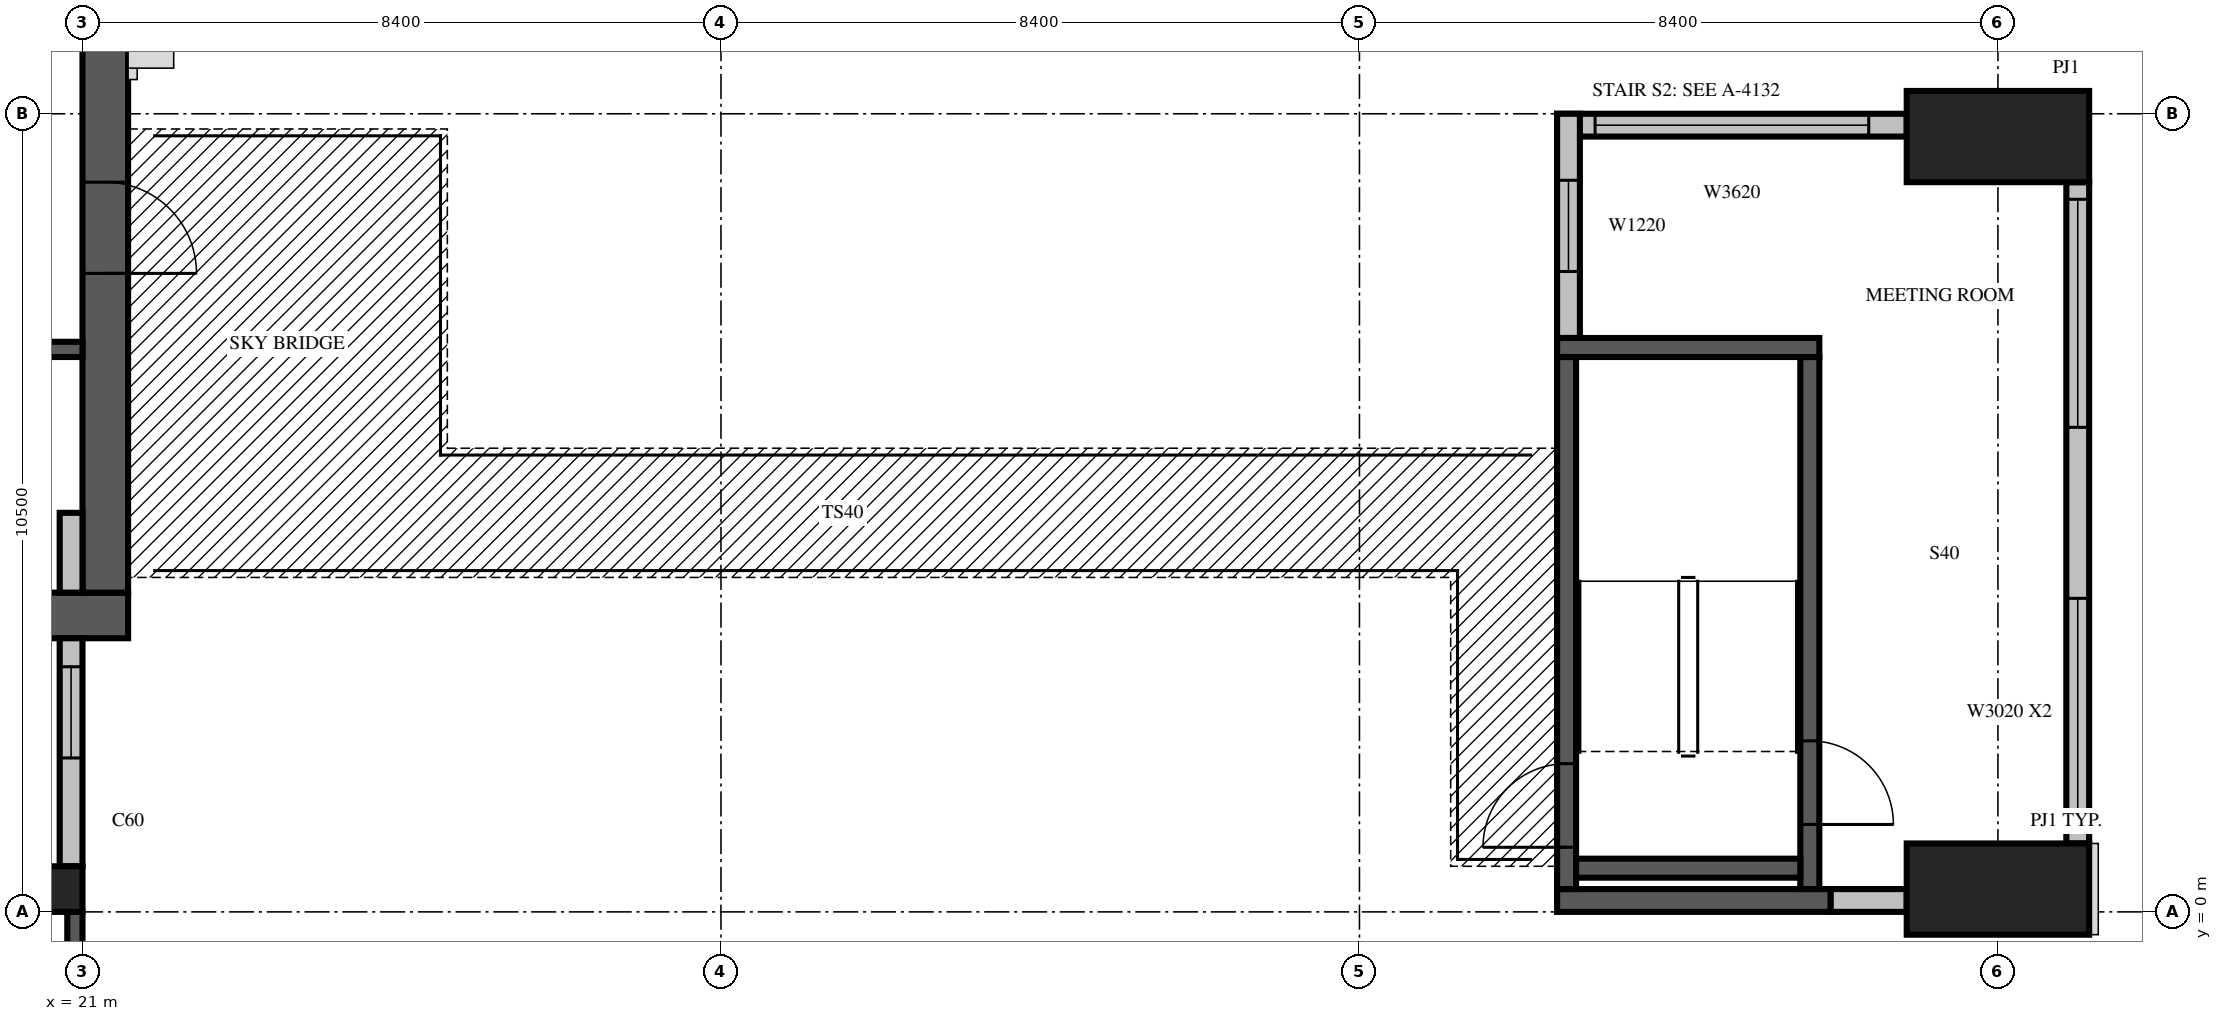
"""IFC4 building model, lengths in metres.
Left out: names, types, materials, properties, quantities, classifications, styles, units other than length and angle.
Written with IfcOpenShell. Run it as: python <this file> out.ifc"""

import sys

from ifc_helpers import new_model, si_unit, direction, frame, frame_2d, origin, origin_2d, place, context, subcontext, project, spatial, rectangle, extrude, source, transform, mapped, element, fill, save


model = new_model("IFC4")
c1 = context("Model", 3, precision=1e-05, world=origin(), true_north=direction((0.0, 1.0)))
c2 = subcontext(c1, "Body", "Model", "MODEL_VIEW")
j1 = project(units=[si_unit("LENGTHUNIT", "METRE"), si_unit("PLANEANGLEUNIT", "RADIAN")], contexts=[c1])
p1 = place(None, origin())
s1 = spatial("IfcSite", under=j1, at=p1, CompositionType="ELEMENT")
p2 = place(p1, origin())
s2 = spatial("IfcBuilding", under=s1, at=p2, CompositionType="ELEMENT")
p3 = place(p2, frame((0.0, 0.0, 333.5)))
s3 = spatial("IfcBuildingStorey", under=s2, at=p3, CompositionType="ELEMENT", Elevation=333.5)
m1 = source(origin(), c2, "Body", "SweptSolid", [
    extrude(rectangle(XDim=0.6, YDim=0.6, at=origin_2d()), origin(), (0.0, 0.0, 1.0), 3.5),
])
p4 = place(p3, frame((20.7, 0.3, 0.0), z_axis=(0.0, 0.0, 1.0), x_axis=(1.0, 0.0, 0.0)))
e1 = element("IfcColumn", 1, at=p4, inside=s3, PredefinedType="COLUMN", context=c2, shape_type="MappedRepresentation", body=[
    mapped(m1, transform((0.0, 0.0, 0.0), scale=1.0)),
])
m2 = source(origin(), c2, "Body", "SweptSolid", [
    extrude(rectangle(XDim=2.4, YDim=1.2, at=origin_2d()), origin(), (0.0, 0.0, 1.0), 3.5),
])
for number, where, z_axis, x_axis in (
    (2, (46.2, 0.3, 0.0), (0.0, 0.0, 1.0), (1.0, 0.0, 0.0)),
    (3, (46.2, 10.2, 0.0), (0.0, 0.0, 1.0), (1.0, 0.0, 0.0)),
):
    element("IfcColumn", number, at=place(p3, frame(where, z_axis=z_axis, x_axis=x_axis)), inside=s3, PredefinedType="PILASTER", context=c2, shape_type="MappedRepresentation", body=[
        mapped(m2, transform((0.0, 0.0, 0.0), scale=1.0)),
    ])
m3 = source(origin(), c2, "Body", "SweptSolid", [
    extrude(rectangle(XDim=17.4, YDim=0.6, at=frame_2d((8.7, 0.0))), origin(), (0.0, 0.0, 1.0), 3.5),
])
p5 = place(p3, frame((4.2, 3.9, 0.0), z_axis=(0.0, 0.0, 1.0), x_axis=(1.0, 0.0, 0.0)))
e4 = element("IfcWall", 4, at=p5, inside=s3, PredefinedType="SHEAR", context=c2, shape_type="MappedRepresentation", body=[
    mapped(m3, transform((0.0, 0.0, 0.0), scale=1.0)),
])
m4 = source(origin(), c2, "Body", "SweptSolid", [
    extrude(rectangle(XDim=0.9, YDim=2.1, at=frame_2d((0.45, 1.05))), frame((0.0, 0.31, 0.0), z_axis=(0.0, -1.0, 0.0), x_axis=(1.0, 0.0, 0.0)), (0.0, 0.0, 1.0), 0.62),
])
p6 = place(p5, frame((15.2, 0.0, 0.0)))
e5 = element("IfcOpeningElement", 5, at=p6, cuts=e4, PredefinedType="OPENING", context=c2, shape_type="MappedRepresentation", body=[
    mapped(m4, transform((0.0, 0.0, 0.0), scale=1.0)),
])
p7 = place(p3, frame((21.3, 4.2, 0.0), z_axis=(0.0, 0.0, 1.0), x_axis=(0.0, 1.0, 0.0)))
e6 = element("IfcWall", 6, at=p7, inside=s3, PredefinedType="SHEAR", context=c2, shape_type="SweptSolid", body=[
    extrude(rectangle(XDim=16.8, YDim=0.6, at=frame_2d((8.4, 0.0))), origin(), (0.0, 0.0, 1.0), 3.5),
])
m5 = source(origin(), c2, "Body", "SweptSolid", [
    extrude(rectangle(XDim=1.2, YDim=2.1, at=frame_2d((0.6, 1.05))), frame((0.0, 0.31, 0.0), z_axis=(0.0, -1.0, 0.0), x_axis=(1.0, 0.0, 0.0)), (0.0, 0.0, 1.0), 0.62),
])
p8 = place(p7, frame((4.2, 0.0, 0.0)))
e7 = element("IfcOpeningElement", 7, at=p8, cuts=e6, PredefinedType="OPENING", context=c2, shape_type="MappedRepresentation", body=[
    mapped(m5, transform((0.0, 0.0, 0.0), scale=1.0)),
])
m6 = source(origin(), c2, "Body", "SweptSolid", [
    extrude(rectangle(XDim=1.2, YDim=2.4, at=frame_2d((0.6, 1.2))), frame((0.0, 0.31, 0.0), z_axis=(0.0, -1.0, 0.0), x_axis=(1.0, 0.0, 0.0)), (0.0, 0.0, 1.0), 0.62),
])
p9 = place(p7, frame((12.0, 0.0, 0.6)))
e8 = element("IfcOpeningElement", 8, at=p9, cuts=e6, PredefinedType="OPENING", context=c2, shape_type="MappedRepresentation", body=[
    mapped(m6, transform((0.0, 0.0, 0.0), scale=1.0)),
])
m7 = source(origin(), c2, "Body", "SweptSolid", [
    extrude(rectangle(XDim=3.0, YDim=0.3, at=frame_2d((1.5, 0.0))), origin(), (0.0, 0.0, 1.0), 3.1),
])
p10 = place(p3, frame((20.85, 0.6, 0.0), z_axis=(0.0, 0.0, 1.0), x_axis=(0.0, 1.0, 0.0)))
e9 = element("IfcWall", 9, at=p10, inside=s3, PredefinedType="STANDARD", context=c2, shape_type="MappedRepresentation", body=[
    mapped(m7, transform((0.0, 0.0, 0.0), scale=1.0)),
])
m8 = source(origin(), c2, "Body", "SweptSolid", [
    extrude(rectangle(XDim=1.2, YDim=2.0, at=frame_2d((0.6, 1.0))), frame((0.0, 0.16, 0.0), z_axis=(0.0, -1.0, 0.0), x_axis=(1.0, 0.0, 0.0)), (0.0, 0.0, 1.0), 0.32),
])
p11 = place(p10, frame((1.425, 0.0, 0.6)))
e10 = element("IfcOpeningElement", 10, at=p11, cuts=e9, PredefinedType="OPENING", context=c2, shape_type="MappedRepresentation", body=[
    mapped(m8, transform((0.0, 0.0, 0.0), scale=1.0)),
])
m9 = source(origin(), c2, "Body", "SweptSolid", [
    extrude(rectangle(XDim=1.05, YDim=0.3, at=frame_2d((0.525, 0.0))), origin(), (0.0, 0.0, 1.0), 3.1),
])
p12 = place(p3, frame((20.85, 4.2, 0.0), z_axis=(0.0, 0.0, 1.0), x_axis=(0.0, 1.0, 0.0)))
e11 = element("IfcWall", 11, at=p12, inside=s3, PredefinedType="STANDARD", context=c2, shape_type="MappedRepresentation", body=[
    mapped(m9, transform((0.0, 0.0, 0.0), scale=1.0)),
])
p13 = place(p3, frame((40.4, 0.15, 0.0), z_axis=(0.0, 0.0, 1.0), x_axis=(1.0, 0.0, 0.0)))
e12 = element("IfcWall", 12, at=p13, inside=s3, PredefinedType="SOLIDWALL", context=c2, shape_type="SweptSolid", body=[
    extrude(rectangle(XDim=3.6, YDim=0.3, at=frame_2d((1.8, 0.0))), origin(), (0.0, 0.0, 1.0), 3.1),
])
p14 = place(p3, frame((44.0, 0.15, 0.0), z_axis=(0.0, 0.0, 1.0), x_axis=(1.0, 0.0, 0.0)))
e13 = element("IfcWall", 13, at=p14, inside=s3, PredefinedType="STANDARD", context=c2, shape_type="SweptSolid", body=[
    extrude(rectangle(XDim=1.0, YDim=0.3, at=frame_2d((0.5, 0.0))), origin(), (0.0, 0.0, 1.0), 3.1),
])
p15 = place(p3, frame((47.25, 0.9, 0.0), z_axis=(0.0, 0.0, 1.0), x_axis=(0.0, 1.0, 0.0)))
e14 = element("IfcWall", 14, at=p15, inside=s3, PredefinedType="STANDARD", context=c2, shape_type="SweptSolid", body=[
    extrude(rectangle(XDim=8.7, YDim=0.3, at=frame_2d((4.35, 0.0))), origin(), (0.0, 0.0, 1.0), 3.1),
])
m10 = source(origin(), c2, "Body", "SweptSolid", [
    extrude(rectangle(XDim=3.0, YDim=2.0, at=frame_2d((1.5, 1.0))), frame((0.0, 0.16, 0.0), z_axis=(0.0, -1.0, 0.0), x_axis=(1.0, 0.0, 0.0)), (0.0, 0.0, 1.0), 0.32),
])
p16 = place(p15, frame((0.225, 0.0, 0.6)))
e15 = element("IfcOpeningElement", 15, at=p16, cuts=e14, PredefinedType="OPENING", context=c2, shape_type="MappedRepresentation", body=[
    mapped(m10, transform((0.0, 0.0, 0.0), scale=1.0)),
])
p17 = place(p15, frame((5.475, 0.0, 0.6)))
e16 = element("IfcOpeningElement", 16, at=p17, cuts=e14, PredefinedType="OPENING", context=c2, shape_type="MappedRepresentation", body=[
    mapped(m10, transform((0.0, 0.0, 0.0), scale=1.0)),
])
p18 = place(p3, frame((45.0, 10.35, 0.0), z_axis=(0.0, 0.0, 1.0), x_axis=(-1.0, 0.0, 0.0)))
e17 = element("IfcWall", 17, at=p18, inside=s3, PredefinedType="STANDARD", context=c2, shape_type="SweptSolid", body=[
    extrude(rectangle(XDim=4.6, YDim=0.3, at=frame_2d((2.3, 0.0))), origin(), (0.0, 0.0, 1.0), 3.1),
])
m11 = source(origin(), c2, "Body", "SweptSolid", [
    extrude(rectangle(XDim=3.6, YDim=2.0, at=frame_2d((1.8, 1.0))), frame((0.0, 0.16, 0.0), z_axis=(0.0, -1.0, 0.0), x_axis=(1.0, 0.0, 0.0)), (0.0, 0.0, 1.0), 0.32),
])
p19 = place(p18, frame((0.5, 0.0, 0.6)))
e18 = element("IfcOpeningElement", 18, at=p19, cuts=e17, PredefinedType="OPENING", context=c2, shape_type="MappedRepresentation", body=[
    mapped(m11, transform((0.0, 0.0, 0.0), scale=1.0)),
])
p20 = place(p3, frame((40.55, 10.5, 0.0), z_axis=(0.0, 0.0, 1.0), x_axis=(0.0, -1.0, 0.0)))
e19 = element("IfcWall", 19, at=p20, inside=s3, PredefinedType="STANDARD", context=c2, shape_type="SweptSolid", body=[
    extrude(rectangle(XDim=2.95, YDim=0.3, at=frame_2d((1.475, 0.0))), origin(), (0.0, 0.0, 1.0), 3.1),
])
p21 = place(p20, frame((0.875, 0.0, 0.6)))
e20 = element("IfcOpeningElement", 20, at=p21, cuts=e19, PredefinedType="OPENING", context=c2, shape_type="MappedRepresentation", body=[
    mapped(m8, transform((0.0, 0.0, 0.0), scale=1.0)),
])
m12 = source(origin(), c2, "Body", "SweptSolid", [
    extrude(rectangle(XDim=3.9, YDim=0.2, at=frame_2d((1.95, 0.0))), origin(), (0.0, 0.0, 1.0), 3.09),
])
p22 = place(p3, frame((20.9, 0.0, 0.0), z_axis=(0.0, 0.0, 1.0), x_axis=(0.0, -1.0, 0.0)))
e21 = element("IfcWall", 21, at=p22, inside=s3, PredefinedType="SOLIDWALL", context=c2, shape_type="MappedRepresentation", body=[
    mapped(m12, transform((0.0, 0.0, 0.0), scale=1.0)),
])
m13 = source(origin(), c2, "Body", "SweptSolid", [
    extrude(rectangle(XDim=2.4, YDim=2.0, at=frame_2d((1.2, 1.0))), frame((0.0, 0.11, 0.0), z_axis=(0.0, -1.0, 0.0), x_axis=(1.0, 0.0, 0.0)), (0.0, 0.0, 1.0), 0.22),
])
p23 = place(p22, frame((0.75, 0.0, 0.6)))
e22 = element("IfcOpeningElement", 22, at=p23, cuts=e21, PredefinedType="OPENING", context=c2, shape_type="MappedRepresentation", body=[
    mapped(m13, transform((0.0, 0.0, 0.0), scale=1.0)),
])
m14 = source(origin(), c2, "Body", "SweptSolid", [
    extrude(rectangle(XDim=7.2, YDim=0.2, at=frame_2d((3.6, 0.0))), origin(), (0.0, 0.0, 1.0), 3.1),
])
p24 = place(p3, frame((13.8, 7.4, 0.0), z_axis=(0.0, 0.0, 1.0), x_axis=(1.0, 0.0, 0.0)))
e23 = element("IfcWall", 23, at=p24, inside=s3, PredefinedType="SOLIDWALL", context=c2, shape_type="MappedRepresentation", body=[
    mapped(m14, transform((0.0, 0.0, 0.0), scale=1.0)),
])
m15 = source(origin(), c2, "Body", "SweptSolid", [
    extrude(rectangle(XDim=0.9, YDim=2.1, at=frame_2d((0.45, 1.05))), frame((0.0, 0.11, 0.0), z_axis=(0.0, -1.0, 0.0), x_axis=(1.0, 0.0, 0.0)), (0.0, 0.0, 1.0), 0.22),
])
p25 = place(p24, frame((1.95, 0.0, 0.0)))
e24 = element("IfcOpeningElement", 24, at=p25, cuts=e23, PredefinedType="OPENING", context=c2, shape_type="MappedRepresentation", body=[
    mapped(m15, transform((0.0, 0.0, 0.0), scale=1.0)),
])
p26 = place(p24, frame((5.55, 0.0, 0.0)))
e25 = element("IfcOpeningElement", 25, at=p26, cuts=e23, PredefinedType="OPENING", context=c2, shape_type="MappedRepresentation", body=[
    mapped(m15, transform((0.0, 0.0, 0.0), scale=1.0)),
])
m16 = source(origin(), c2, "Body", "SweptSolid", [
    extrude(rectangle(XDim=7.0, YDim=0.25, at=frame_2d((3.5, 0.0))), origin(), (0.0, 0.0, 1.0), 3.1),
])
p27 = place(p3, frame((40.525, 0.3, 0.0), z_axis=(0.0, 0.0, 1.0), x_axis=(0.0, 1.0, 0.0)))
e26 = element("IfcWall", 26, at=p27, inside=s3, PredefinedType="SOLIDWALL", context=c2, shape_type="MappedRepresentation", body=[
    mapped(m16, transform((0.0, 0.0, 0.0), scale=1.0)),
])
m17 = source(origin(), c2, "Body", "SweptSolid", [
    extrude(rectangle(XDim=1.1, YDim=2.1, at=frame_2d((0.55, 1.05))), frame((0.0, 0.135, 0.0), z_axis=(0.0, -1.0, 0.0), x_axis=(1.0, 0.0, 0.0)), (0.0, 0.0, 1.0), 0.27),
])
p28 = place(p27, frame((0.55, 0.0, 0.0)))
e27 = element("IfcOpeningElement", 27, at=p28, cuts=e26, PredefinedType="OPENING", context=c2, shape_type="MappedRepresentation", body=[
    mapped(m17, transform((0.0, 0.0, 0.0), scale=1.0)),
])
p29 = place(p3, frame((43.725, 0.3, 0.0), z_axis=(0.0, 0.0, 1.0), x_axis=(0.0, 1.0, 0.0)))
e28 = element("IfcWall", 28, at=p29, inside=s3, PredefinedType="SOLIDWALL", context=c2, shape_type="MappedRepresentation", body=[
    mapped(m16, transform((0.0, 0.0, 0.0), scale=1.0)),
])
p30 = place(p29, frame((0.85, 0.0, 0.0)))
e29 = element("IfcOpeningElement", 29, at=p30, cuts=e28, PredefinedType="OPENING", context=c2, shape_type="MappedRepresentation", body=[
    mapped(m17, transform((0.0, 0.0, 0.0), scale=1.0)),
])
m18 = source(origin(), c2, "Body", "SweptSolid", [
    extrude(rectangle(XDim=3.45, YDim=0.25, at=frame_2d((1.725, 0.0))), origin(), (0.0, 0.0, 1.0), 3.1),
])
p31 = place(p3, frame((40.4, 7.425, 0.0), z_axis=(0.0, 0.0, 1.0), x_axis=(1.0, 0.0, 0.0)))
e30 = element("IfcWall", 30, at=p31, inside=s3, PredefinedType="SOLIDWALL", context=c2, shape_type="MappedRepresentation", body=[
    mapped(m18, transform((0.0, 0.0, 0.0), scale=1.0)),
])
m19 = source(origin(), c2, "Body", "SweptSolid", [
    extrude(rectangle(XDim=2.95, YDim=0.25, at=frame_2d((1.475, 0.0))), origin(), (0.0, 0.0, 1.0), 3.1),
])
p32 = place(p3, frame((40.65, 0.575, 0.0), z_axis=(0.0, 0.0, 1.0), x_axis=(1.0, 0.0, 0.0)))
e31 = element("IfcWall", 31, at=p32, inside=s3, PredefinedType="SOLIDWALL", context=c2, shape_type="MappedRepresentation", body=[
    mapped(m19, transform((0.0, 0.0, 0.0), scale=1.0)),
])
m20 = source(origin(), c2, "Body", "SweptSolid", [
    extrude(rectangle(XDim=1.2, YDim=2.0, at=frame_2d((0.6, 1.0))), frame((0.0, 0.03, 0.0), z_axis=(0.0, -1.0, 0.0), x_axis=(1.0, 0.0, 0.0)), (0.0, 0.0, 1.0), 0.06),
])
p33 = place(p11, origin())
e32 = element("IfcWindow", 32, at=p33, inside=s3, PartitioningType="SINGLE_PANEL", PredefinedType="WINDOW", context=c2, shape_type="MappedRepresentation", body=[
    mapped(m20, transform((0.0, 0.0, 0.0), scale=1.0)),
])
fill(e10, e32)
m21 = source(origin(), c2, "Body", "SweptSolid", [
    extrude(rectangle(XDim=3.0, YDim=2.0, at=frame_2d((1.5, 1.0))), frame((0.0, 0.03, 0.0), z_axis=(0.0, -1.0, 0.0), x_axis=(1.0, 0.0, 0.0)), (0.0, 0.0, 1.0), 0.06),
])
p34 = place(p16, origin())
e33 = element("IfcWindow", 33, at=p34, inside=s3, PartitioningType="SINGLE_PANEL", PredefinedType="WINDOW", context=c2, shape_type="MappedRepresentation", body=[
    mapped(m21, transform((0.0, 0.0, 0.0), scale=1.0)),
])
fill(e15, e33)
p35 = place(p17, origin())
e34 = element("IfcWindow", 34, at=p35, inside=s3, PartitioningType="SINGLE_PANEL", PredefinedType="WINDOW", context=c2, shape_type="MappedRepresentation", body=[
    mapped(m21, transform((0.0, 0.0, 0.0), scale=1.0)),
])
fill(e16, e34)
m22 = source(origin(), c2, "Body", "SweptSolid", [
    extrude(rectangle(XDim=3.6, YDim=2.0, at=frame_2d((1.8, 1.0))), frame((0.0, 0.03, 0.0), z_axis=(0.0, -1.0, 0.0), x_axis=(1.0, 0.0, 0.0)), (0.0, 0.0, 1.0), 0.06),
])
p36 = place(p19, origin())
e35 = element("IfcWindow", 35, at=p36, inside=s3, PartitioningType="SINGLE_PANEL", PredefinedType="WINDOW", context=c2, shape_type="MappedRepresentation", body=[
    mapped(m22, transform((0.0, 0.0, 0.0), scale=1.0)),
])
fill(e18, e35)
p37 = place(p21, origin())
e36 = element("IfcWindow", 36, at=p37, inside=s3, PartitioningType="SINGLE_PANEL", PredefinedType="WINDOW", context=c2, shape_type="MappedRepresentation", body=[
    mapped(m20, transform((0.0, 0.0, 0.0), scale=1.0)),
])
fill(e20, e36)
m23 = source(origin(), c2, "Body", "SweptSolid", [
    extrude(rectangle(XDim=1.1, YDim=2.1, at=frame_2d((0.55, 1.05))), frame((0.0, 0.025, 0.0), z_axis=(0.0, -1.0, 0.0), x_axis=(1.0, 0.0, 0.0)), (0.0, 0.0, 1.0), 0.05),
])
p38 = place(p28, origin())
e37 = element("IfcDoor", 37, at=p38, inside=s3, OperationType="SINGLE_SWING_LEFT", PredefinedType="DOOR", context=c2, shape_type="MappedRepresentation", body=[
    mapped(m23, transform((0.0, 0.0, 0.0), scale=1.0)),
])
fill(e27, e37)
p39 = place(p30, origin())
e38 = element("IfcDoor", 38, at=p39, inside=s3, OperationType="SINGLE_SWING_RIGHT", PredefinedType="DOOR", context=c2, shape_type="MappedRepresentation", body=[
    mapped(m23, transform((0.0, 0.0, 0.0), scale=1.0)),
])
fill(e29, e38)
m24 = source(origin(), c2, "Body", "SweptSolid", [
    extrude(rectangle(XDim=1.2, YDim=2.1, at=frame_2d((0.6, 1.05))), frame((0.0, 0.025, 0.0), z_axis=(0.0, -1.0, 0.0), x_axis=(1.0, 0.0, 0.0)), (0.0, 0.0, 1.0), 0.05),
])
p40 = place(p8, origin())
e39 = element("IfcDoor", 39, at=p40, inside=s3, OperationType="SINGLE_SWING_RIGHT", PredefinedType="DOOR", context=c2, shape_type="MappedRepresentation", body=[
    mapped(m24, transform((0.0, 0.0, 0.0), scale=1.0)),
])
fill(e7, e39)
save(model, sys.argv[1])
